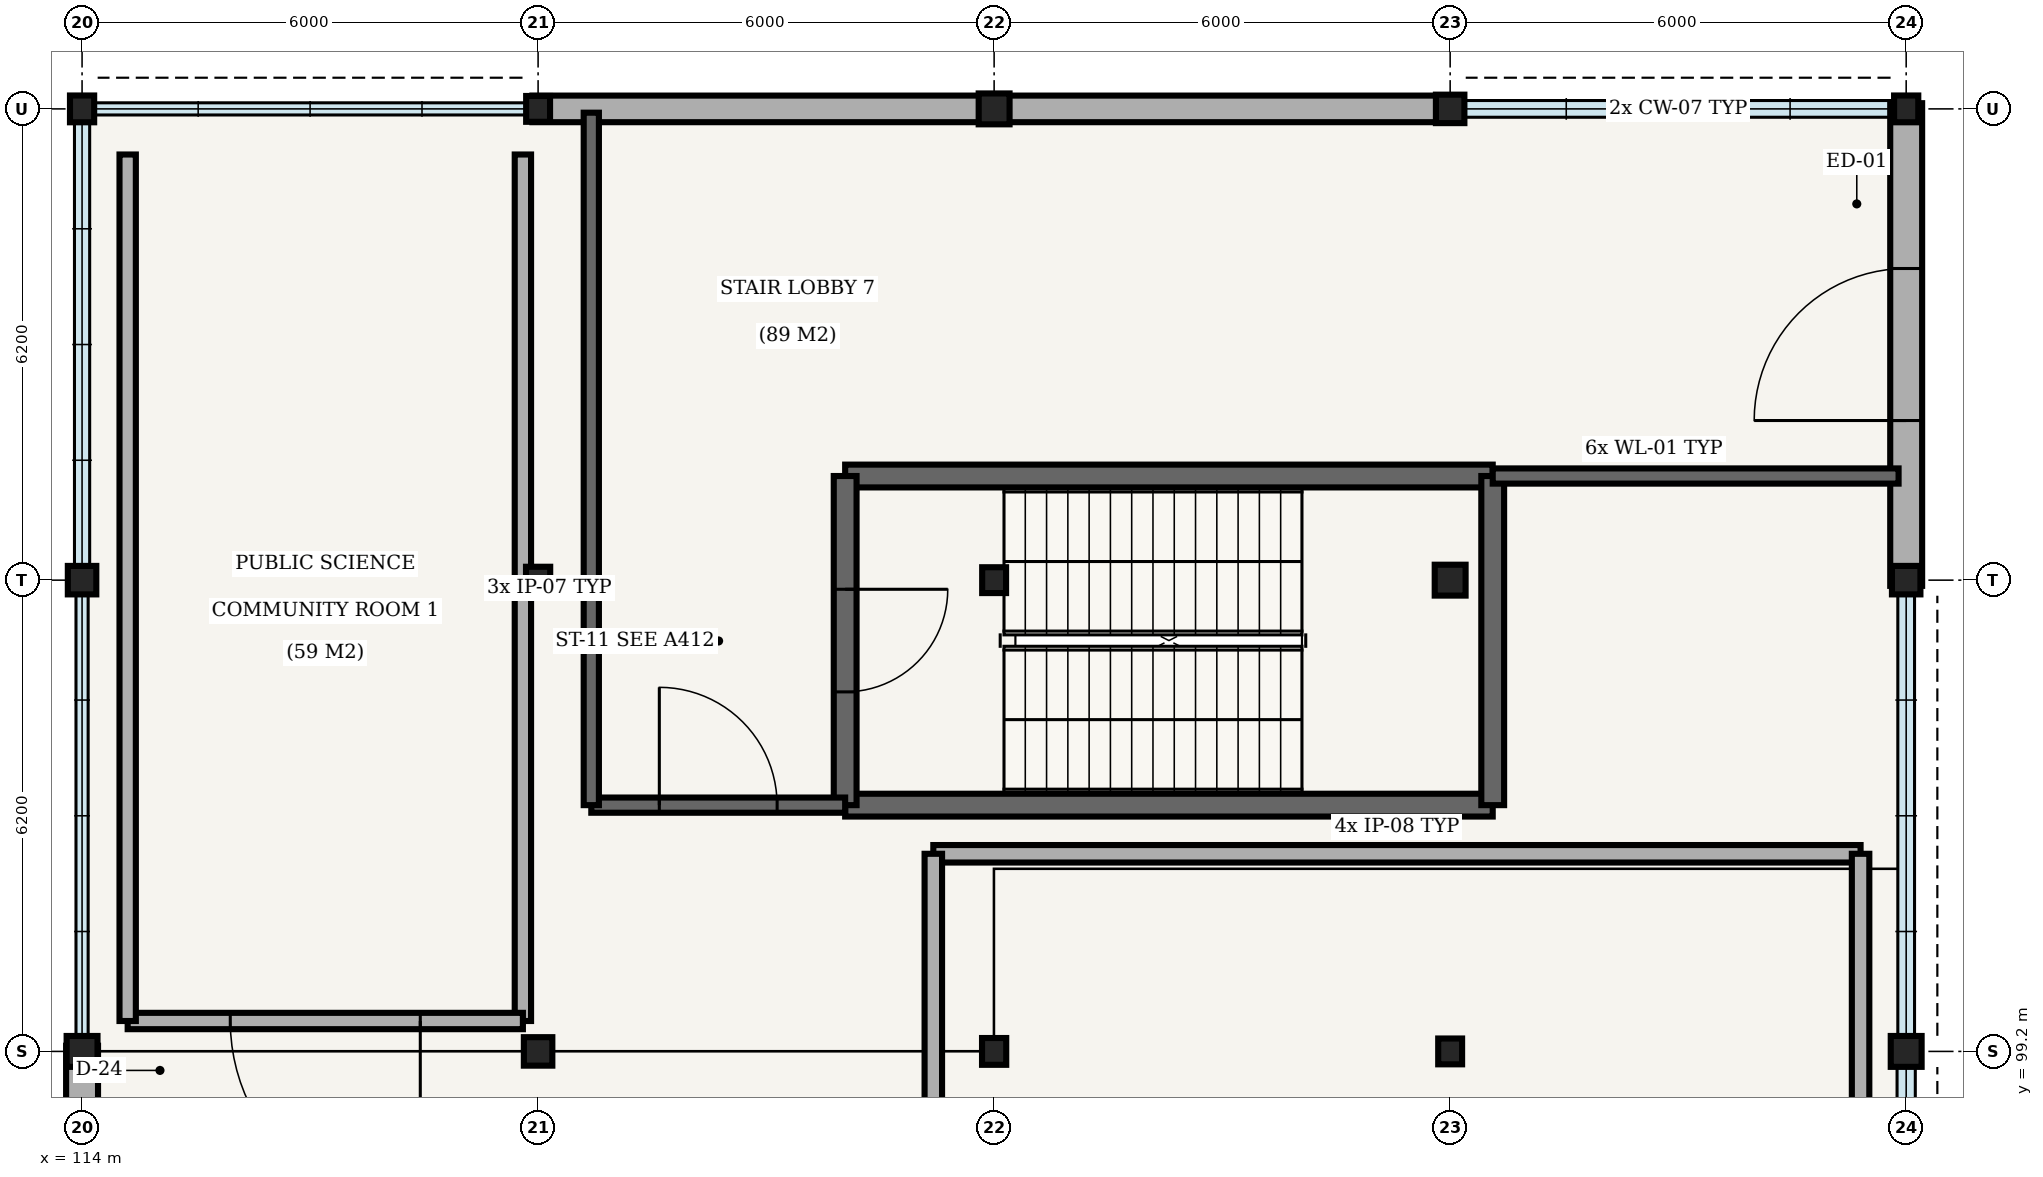
"""IFC4 building model, lengths in metres.
Left out: names, types, materials, properties, quantities, classifications, styles, units other than length and angle.
Written with IfcOpenShell. Run it as: python <this file> out.ifc"""

import sys

from ifc_helpers import new_model, si_unit, direction, frame, frame_2d, origin, origin_2d, place, context, subcontext, project, spatial, rectangle, hollow_circle, i_section, extrude, element, fill, save


model = new_model("IFC4")
c1 = context("Model", 3, precision=1e-05, world=origin(), true_north=direction((0.0, 1.0)))
c2 = subcontext(c1, "Body", "Model", "MODEL_VIEW")
j1 = project(units=[si_unit("LENGTHUNIT", "METRE"), si_unit("PLANEANGLEUNIT", "RADIAN")], contexts=[c1])
p1 = place(None, origin())
s1 = spatial("IfcSite", under=j1, at=p1, CompositionType="ELEMENT")
p2 = place(p1, origin())
s2 = spatial("IfcBuilding", under=s1, at=p2, CompositionType="ELEMENT")
p3 = place(p2, origin())
s3 = spatial("IfcBuildingStorey", under=s2, at=p3, CompositionType="ELEMENT", Elevation=0.0)
p4 = place(p3, frame((114.0, 99.2, -5.8), z_axis=(0.0, 0.0, 1.0), x_axis=(1.0, 0.0, 0.0)))
e1 = element("IfcColumn", 1, at=p4, inside=s3, PredefinedType="COLUMN", context=c2, shape_type="SweptSolid", body=[
    extrude(hollow_circle(Radius=0.203, WallThickness=0.016, at=origin_2d()), origin(), (0.0, 0.0, 1.0), 11.2),
])
p5 = place(p3, frame((114.0, 105.4, -5.8), z_axis=(0.0, 0.0, 1.0), x_axis=(1.0, 0.0, 0.0)))
e2 = element("IfcColumn", 2, at=p5, inside=s3, PredefinedType="COLUMN", context=c2, shape_type="SweptSolid", body=[
    extrude(i_section(OverallWidth=0.375, OverallDepth=0.375, WebThickness=0.017, FlangeThickness=0.027, FilletRadius=0.015, at=origin_2d()), origin(), (0.0, 0.0, 1.0), 11.2),
])
p6 = place(p3, frame((114.0, 111.6, -5.8), z_axis=(0.0, 0.0, 1.0), x_axis=(1.0, 0.0, 0.0)))
e3 = element("IfcColumn", 3, at=p6, inside=s3, PredefinedType="COLUMN", context=c2, shape_type="SweptSolid", body=[
    extrude(i_section(OverallWidth=0.318, OverallDepth=0.353, WebThickness=0.023, FlangeThickness=0.038, FilletRadius=0.015, at=origin_2d()), origin(), (0.0, 0.0, 1.0), 11.2),
])
p7 = place(p3, frame((120.0, 99.2, -5.8), z_axis=(0.0, 0.0, 1.0), x_axis=(1.0, 0.0, 0.0)))
e4 = element("IfcColumn", 4, at=p7, inside=s3, PredefinedType="COLUMN", context=c2, shape_type="SweptSolid", body=[
    extrude(i_section(OverallWidth=0.375, OverallDepth=0.375, WebThickness=0.017, FlangeThickness=0.027, FilletRadius=0.015, at=origin_2d()), origin(), (0.0, 0.0, 1.0), 11.2),
])
p8 = place(p3, frame((120.0, 105.4, -5.8), z_axis=(0.0, 0.0, 1.0), x_axis=(1.0, 0.0, 0.0)))
e5 = element("IfcColumn", 5, at=p8, inside=s3, PredefinedType="COLUMN", context=c2, shape_type="SweptSolid", body=[
    extrude(i_section(OverallWidth=0.318, OverallDepth=0.353, WebThickness=0.023, FlangeThickness=0.038, FilletRadius=0.015, at=origin_2d()), origin(), (0.0, 0.0, 1.0), 11.2),
])
p9 = place(p3, frame((120.0, 111.6, -5.8), z_axis=(0.0, 0.0, 1.0), x_axis=(1.0, 0.0, 0.0)))
e6 = element("IfcColumn", 6, at=p9, inside=s3, PredefinedType="COLUMN", context=c2, shape_type="SweptSolid", body=[
    extrude(i_section(OverallWidth=0.314, OverallDepth=0.34, WebThickness=0.019, FlangeThickness=0.031, FilletRadius=0.015, at=origin_2d()), origin(), (0.0, 0.0, 1.0), 11.2),
])
p10 = place(p3, frame((126.0, 99.2, -5.8), z_axis=(0.0, 0.0, 1.0), x_axis=(1.0, 0.0, 0.0)))
e7 = element("IfcColumn", 7, at=p10, inside=s3, PredefinedType="COLUMN", context=c2, shape_type="SweptSolid", body=[
    extrude(i_section(OverallWidth=0.318, OverallDepth=0.353, WebThickness=0.023, FlangeThickness=0.038, FilletRadius=0.015, at=origin_2d()), origin(), (0.0, 0.0, 1.0), 11.2),
])
p11 = place(p3, frame((126.0, 105.4, -5.8), z_axis=(0.0, 0.0, 1.0), x_axis=(1.0, 0.0, 0.0)))
e8 = element("IfcColumn", 8, at=p11, inside=s3, PredefinedType="COLUMN", context=c2, shape_type="SweptSolid", body=[
    extrude(i_section(OverallWidth=0.314, OverallDepth=0.34, WebThickness=0.019, FlangeThickness=0.031, FilletRadius=0.015, at=origin_2d()), origin(), (0.0, 0.0, 1.0), 11.2),
])
p12 = place(p3, frame((126.0, 111.6, -5.8), z_axis=(0.0, 0.0, 1.0), x_axis=(1.0, 0.0, 0.0)))
e9 = element("IfcColumn", 9, at=p12, inside=s3, PredefinedType="COLUMN", context=c2, shape_type="SweptSolid", body=[
    extrude(hollow_circle(Radius=0.203, WallThickness=0.016, at=origin_2d()), origin(), (0.0, 0.0, 1.0), 11.2),
])
p13 = place(p3, frame((132.0, 99.2, -5.8), z_axis=(0.0, 0.0, 1.0), x_axis=(1.0, 0.0, 0.0)))
e10 = element("IfcColumn", 10, at=p13, inside=s3, PredefinedType="COLUMN", context=c2, shape_type="SweptSolid", body=[
    extrude(i_section(OverallWidth=0.314, OverallDepth=0.34, WebThickness=0.019, FlangeThickness=0.031, FilletRadius=0.015, at=origin_2d()), origin(), (0.0, 0.0, 1.0), 11.2),
])
p14 = place(p3, frame((132.0, 105.4, -5.8), z_axis=(0.0, 0.0, 1.0), x_axis=(1.0, 0.0, 0.0)))
e11 = element("IfcColumn", 11, at=p14, inside=s3, PredefinedType="COLUMN", context=c2, shape_type="SweptSolid", body=[
    extrude(hollow_circle(Radius=0.203, WallThickness=0.016, at=origin_2d()), origin(), (0.0, 0.0, 1.0), 11.2),
])
p15 = place(p3, frame((132.0, 111.6, -5.8), z_axis=(0.0, 0.0, 1.0), x_axis=(1.0, 0.0, 0.0)))
e12 = element("IfcColumn", 12, at=p15, inside=s3, PredefinedType="COLUMN", context=c2, shape_type="SweptSolid", body=[
    extrude(i_section(OverallWidth=0.375, OverallDepth=0.375, WebThickness=0.017, FlangeThickness=0.027, FilletRadius=0.015, at=origin_2d()), origin(), (0.0, 0.0, 1.0), 11.2),
])
p16 = place(p3, frame((138.0, 99.2, -5.8), z_axis=(0.0, 0.0, 1.0), x_axis=(1.0, 0.0, 0.0)))
e13 = element("IfcColumn", 13, at=p16, inside=s3, PredefinedType="COLUMN", context=c2, shape_type="SweptSolid", body=[
    extrude(hollow_circle(Radius=0.203, WallThickness=0.016, at=origin_2d()), origin(), (0.0, 0.0, 1.0), 11.2),
])
p17 = place(p3, frame((138.0, 105.4, -5.8), z_axis=(0.0, 0.0, 1.0), x_axis=(1.0, 0.0, 0.0)))
e14 = element("IfcColumn", 14, at=p17, inside=s3, PredefinedType="COLUMN", context=c2, shape_type="SweptSolid", body=[
    extrude(i_section(OverallWidth=0.375, OverallDepth=0.375, WebThickness=0.017, FlangeThickness=0.027, FilletRadius=0.015, at=origin_2d()), origin(), (0.0, 0.0, 1.0), 11.2),
])
p18 = place(p3, frame((138.0, 111.6, -5.8), z_axis=(0.0, 0.0, 1.0), x_axis=(1.0, 0.0, 0.0)))
e15 = element("IfcColumn", 15, at=p18, inside=s3, PredefinedType="COLUMN", context=c2, shape_type="SweptSolid", body=[
    extrude(i_section(OverallWidth=0.318, OverallDepth=0.353, WebThickness=0.023, FlangeThickness=0.038, FilletRadius=0.015, at=origin_2d()), origin(), (0.0, 0.0, 1.0), 11.2),
])
for number, where, z_axis, x_axis in (
    (16, (126.075, 111.6, 0.0), (0.0, 0.0, 1.0), (-1.0, 0.0, 0.0)),
    (17, (132.075, 111.6, 0.0), (0.0, 0.0, 1.0), (-1.0, 0.0, 0.0)),
):
    element("IfcWall", number, at=place(p3, frame(where, z_axis=z_axis, x_axis=x_axis)), inside=s3, PredefinedType="SOLIDWALL", context=c2, shape_type="SweptSolid", body=[
        extrude(rectangle(XDim=6.15, YDim=0.35, at=frame_2d((3.075, 0.0))), origin(), (0.0, 0.0, 1.0), 4.44),
    ])
p19 = place(p3, frame((114.0, 99.275, 0.0), z_axis=(0.0, 0.0, 1.0), x_axis=(0.0, -1.0, 0.0)))
e18 = element("IfcWall", 18, at=p19, inside=s3, PredefinedType="SOLIDWALL", context=c2, shape_type="SweptSolid", body=[
    extrude(rectangle(XDim=6.35, YDim=0.42, at=frame_2d((3.175, 0.0))), origin(), (0.0, 0.0, 1.0), 4.44),
])
p20 = place(p19, frame((2.225, 0.0, 0.0)))
e19 = element("IfcOpeningElement", 19, at=p20, cuts=e18, PredefinedType="OPENING", context=c2, shape_type="SweptSolid", body=[
    extrude(rectangle(XDim=1.9, YDim=2.4, at=frame_2d((0.95, 1.2))), frame((0.0, 0.22, 0.0), z_axis=(0.0, -1.0, 0.0), x_axis=(1.0, 0.0, 0.0)), (0.0, 0.0, 1.0), 0.44),
])
p21 = place(p3, frame((138.0, 105.325, 0.0), z_axis=(0.0, 0.0, 1.0), x_axis=(0.0, 1.0, 0.0)))
e20 = element("IfcWall", 20, at=p21, inside=s3, PredefinedType="SOLIDWALL", context=c2, shape_type="SweptSolid", body=[
    extrude(rectangle(XDim=6.35, YDim=0.42, at=frame_2d((3.175, 0.0))), origin(), (0.0, 0.0, 1.0), 4.44),
])
p22 = place(p21, frame((2.175, 0.0, 0.0)))
e21 = element("IfcOpeningElement", 21, at=p22, cuts=e20, PredefinedType="OPENING", context=c2, shape_type="SweptSolid", body=[
    extrude(rectangle(XDim=2.0, YDim=2.4, at=frame_2d((1.0, 1.2))), frame((0.0, 0.22, 0.0), z_axis=(0.0, -1.0, 0.0), x_axis=(1.0, 0.0, 0.0)), (0.0, 0.0, 1.0), 0.44),
])
for number, where, z_axis, x_axis in (
    (22, (124.04, 102.44, 0.0), (0.0, 0.0, 1.0), (1.0, 0.0, 0.0)),
    (23, (132.56, 106.77, 0.0), (0.0, 0.0, 1.0), (-1.0, 0.0, 0.0)),
):
    element("IfcWall", number, at=place(p3, frame(where, z_axis=z_axis, x_axis=x_axis)), inside=s3, PredefinedType="SHEAR", context=c2, shape_type="SweptSolid", body=[
        extrude(rectangle(XDim=8.52, YDim=0.3, at=frame_2d((4.26, 0.0))), origin(), (0.0, 0.0, 1.0), 5.15),
    ])
p23 = place(p3, frame((124.04, 106.77, 0.0), z_axis=(0.0, 0.0, 1.0), x_axis=(0.0, -1.0, 0.0)))
e24 = element("IfcWall", 24, at=p23, inside=s3, PredefinedType="SHEAR", context=c2, shape_type="SweptSolid", body=[
    extrude(rectangle(XDim=4.33, YDim=0.3, at=frame_2d((2.165, 0.0))), origin(), (0.0, 0.0, 1.0), 5.15),
])
p24 = place(p23, frame((1.49, 0.0, 0.0)))
e25 = element("IfcOpeningElement", 25, at=p24, cuts=e24, PredefinedType="OPENING", context=c2, shape_type="SweptSolid", body=[
    extrude(rectangle(XDim=1.35, YDim=2.2, at=frame_2d((0.675, 1.1))), frame((0.0, 0.16, 0.0), z_axis=(0.0, -1.0, 0.0), x_axis=(1.0, 0.0, 0.0)), (0.0, 0.0, 1.0), 0.32),
])
p25 = place(p3, frame((132.56, 102.44, 0.0), z_axis=(0.0, 0.0, 1.0), x_axis=(0.0, 1.0, 0.0)))
e26 = element("IfcWall", 26, at=p25, inside=s3, PredefinedType="SHEAR", context=c2, shape_type="SweptSolid", body=[
    extrude(rectangle(XDim=4.33, YDim=0.3, at=frame_2d((2.165, 0.0))), origin(), (0.0, 0.0, 1.0), 5.15),
])
p26 = place(p3, frame((120.7, 102.44, 0.0), z_axis=(0.0, 0.0, 1.0), x_axis=(1.0, 0.0, 0.0)))
e27 = element("IfcWall", 27, at=p26, inside=s3, PredefinedType="SHEAR", context=c2, shape_type="SweptSolid", body=[
    extrude(rectangle(XDim=3.34, YDim=0.2, at=frame_2d((1.67, 0.0))), origin(), (0.0, 0.0, 1.0), 5.15),
])
p27 = place(p26, frame((0.895, 0.0, 0.0)))
e28 = element("IfcOpeningElement", 28, at=p27, cuts=e27, PredefinedType="OPENING", context=c2, shape_type="SweptSolid", body=[
    extrude(rectangle(XDim=1.55, YDim=2.2, at=frame_2d((0.775, 1.1))), frame((0.0, 0.11, 0.0), z_axis=(0.0, -1.0, 0.0), x_axis=(1.0, 0.0, 0.0)), (0.0, 0.0, 1.0), 0.22),
])
p28 = place(p3, frame((120.7, 111.55, 0.0), z_axis=(0.0, 0.0, 1.0), x_axis=(0.0, -1.0, 0.0)))
e29 = element("IfcWall", 29, at=p28, inside=s3, PredefinedType="SHEAR", context=c2, shape_type="SweptSolid", body=[
    extrude(rectangle(XDim=9.11, YDim=0.2, at=frame_2d((4.555, 0.0))), origin(), (0.0, 0.0, 1.0), 5.15),
])
p29 = place(p3, frame((132.56, 106.77, 0.0), z_axis=(0.0, 0.0, 1.0), x_axis=(1.0, 0.0, 0.0)))
e30 = element("IfcWall", 30, at=p29, inside=s3, PredefinedType="SHEAR", context=c2, shape_type="SweptSolid", body=[
    extrude(rectangle(XDim=5.34, YDim=0.2, at=frame_2d((2.67, 0.0))), origin(), (0.0, 0.0, 1.0), 5.15),
])
p30 = place(p3, frame((119.8, 111.0, 0.0), z_axis=(0.0, 0.0, 1.0), x_axis=(0.0, -1.0, 0.0)))
e31 = element("IfcWall", 31, at=p30, inside=s3, PredefinedType="PARTITIONING", context=c2, shape_type="SweptSolid", body=[
    extrude(rectangle(XDim=11.4, YDim=0.215, at=frame_2d((5.7, 0.0))), origin(), (0.0, 0.0, 1.0), 4.35),
])
p31 = place(p3, frame((119.8, 99.6, 0.0), z_axis=(0.0, 0.0, 1.0), x_axis=(-1.0, 0.0, 0.0)))
e32 = element("IfcWall", 32, at=p31, inside=s3, PredefinedType="PARTITIONING", context=c2, shape_type="SweptSolid", body=[
    extrude(rectangle(XDim=5.2, YDim=0.215, at=frame_2d((2.6, 0.0))), origin(), (0.0, 0.0, 1.0), 4.35),
])
p32 = place(p31, frame((1.35, 0.0, 0.0)))
e33 = element("IfcOpeningElement", 33, at=p32, cuts=e32, PredefinedType="OPENING", context=c2, shape_type="SweptSolid", body=[
    extrude(rectangle(XDim=2.5, YDim=2.25, at=frame_2d((1.25, 1.125))), frame((0.0, 0.117, 0.0), z_axis=(0.0, -1.0, 0.0), x_axis=(1.0, 0.0, 0.0)), (0.0, 0.0, 1.0), 0.235),
])
p33 = place(p3, frame((114.6, 99.6, 0.0), z_axis=(0.0, 0.0, 1.0), x_axis=(0.0, 1.0, 0.0)))
e34 = element("IfcWall", 34, at=p33, inside=s3, PredefinedType="PARTITIONING", context=c2, shape_type="SweptSolid", body=[
    extrude(rectangle(XDim=11.4, YDim=0.215, at=frame_2d((5.7, 0.0))), origin(), (0.0, 0.0, 1.0), 4.35),
])
p34 = place(p3, frame((125.2, 101.8, 0.0), z_axis=(0.0, 0.0, 1.0), x_axis=(1.0, 0.0, 0.0)))
e35 = element("IfcWall", 35, at=p34, inside=s3, PredefinedType="PARTITIONING", context=c2, shape_type="SweptSolid", body=[
    extrude(rectangle(XDim=12.2, YDim=0.23, at=frame_2d((6.1, 0.0))), origin(), (0.0, 0.0, 1.0), 4.35),
])
p35 = place(p3, frame((137.4, 101.8, 0.0), z_axis=(0.0, 0.0, 1.0), x_axis=(0.0, -1.0, 0.0)))
e36 = element("IfcWall", 36, at=p35, inside=s3, PredefinedType="PARTITIONING", context=c2, shape_type="SweptSolid", body=[
    extrude(rectangle(XDim=14.6, YDim=0.23, at=frame_2d((7.3, 0.0))), origin(), (0.0, 0.0, 1.0), 4.35),
])
p36 = place(p3, frame((125.2, 87.2, 0.0), z_axis=(0.0, 0.0, 1.0), x_axis=(0.0, 1.0, 0.0)))
e37 = element("IfcWall", 37, at=p36, inside=s3, PredefinedType="PARTITIONING", context=c2, shape_type="SweptSolid", body=[
    extrude(rectangle(XDim=14.6, YDim=0.23, at=frame_2d((7.3, 0.0))), origin(), (0.0, 0.0, 1.0), 4.35),
])
p37 = place(p36, frame((8.602, 0.0, 0.0)))
e38 = element("IfcOpeningElement", 38, at=p37, cuts=e37, PredefinedType="OPENING", context=c2, shape_type="SweptSolid", body=[
    extrude(rectangle(XDim=0.9, YDim=2.1, at=frame_2d((0.45, 1.05))), frame((0.0, 0.125, 0.0), z_axis=(0.0, -1.0, 0.0), x_axis=(1.0, 0.0, 0.0)), (0.0, 0.0, 1.0), 0.25),
])
p38 = place(p22, frame((2.0, 0.0, 0.0), z_axis=(0.0, 0.0, 1.0), x_axis=(-1.0, 0.0, 0.0)))
e39 = element("IfcDoor", 39, at=p38, inside=s3, OperationType="DOUBLE_DOOR_SINGLE_SWING", PredefinedType="DOOR", context=c2, shape_type="SweptSolid", body=[
    extrude(rectangle(XDim=2.0, YDim=2.4, at=frame_2d((1.0, 1.2))), frame((0.0, 0.025, 0.0), z_axis=(0.0, -1.0, 0.0), x_axis=(1.0, 0.0, 0.0)), (0.0, 0.0, 1.0), 0.05),
])
fill(e21, e39)
p39 = place(p24, origin())
e40 = element("IfcDoor", 40, at=p39, inside=s3, OperationType="SINGLE_SWING_LEFT", PredefinedType="DOOR", context=c2, shape_type="SweptSolid", body=[
    extrude(rectangle(XDim=1.35, YDim=2.2, at=frame_2d((0.675, 1.1))), frame((0.0, 0.025, 0.0), z_axis=(0.0, -1.0, 0.0), x_axis=(1.0, 0.0, 0.0)), (0.0, 0.0, 1.0), 0.05),
])
fill(e25, e40)
p40 = place(p27, origin())
e41 = element("IfcDoor", 41, at=p40, inside=s3, OperationType="SINGLE_SWING_LEFT", PredefinedType="DOOR", context=c2, shape_type="SweptSolid", body=[
    extrude(rectangle(XDim=1.55, YDim=2.2, at=frame_2d((0.775, 1.1))), frame((0.0, 0.025, 0.0), z_axis=(0.0, -1.0, 0.0), x_axis=(1.0, 0.0, 0.0)), (0.0, 0.0, 1.0), 0.05),
])
fill(e28, e41)
p41 = place(p32, origin())
e42 = element("IfcDoor", 42, at=p41, inside=s3, OperationType="DOUBLE_DOOR_SINGLE_SWING", PredefinedType="DOOR", context=c2, shape_type="SweptSolid", body=[
    extrude(rectangle(XDim=2.5, YDim=2.25, at=frame_2d((1.25, 1.125))), frame((0.0, 0.025, 0.0), z_axis=(0.0, -1.0, 0.0), x_axis=(1.0, 0.0, 0.0)), (0.0, 0.0, 1.0), 0.05),
])
fill(e33, e42)
save(model, sys.argv[1])
